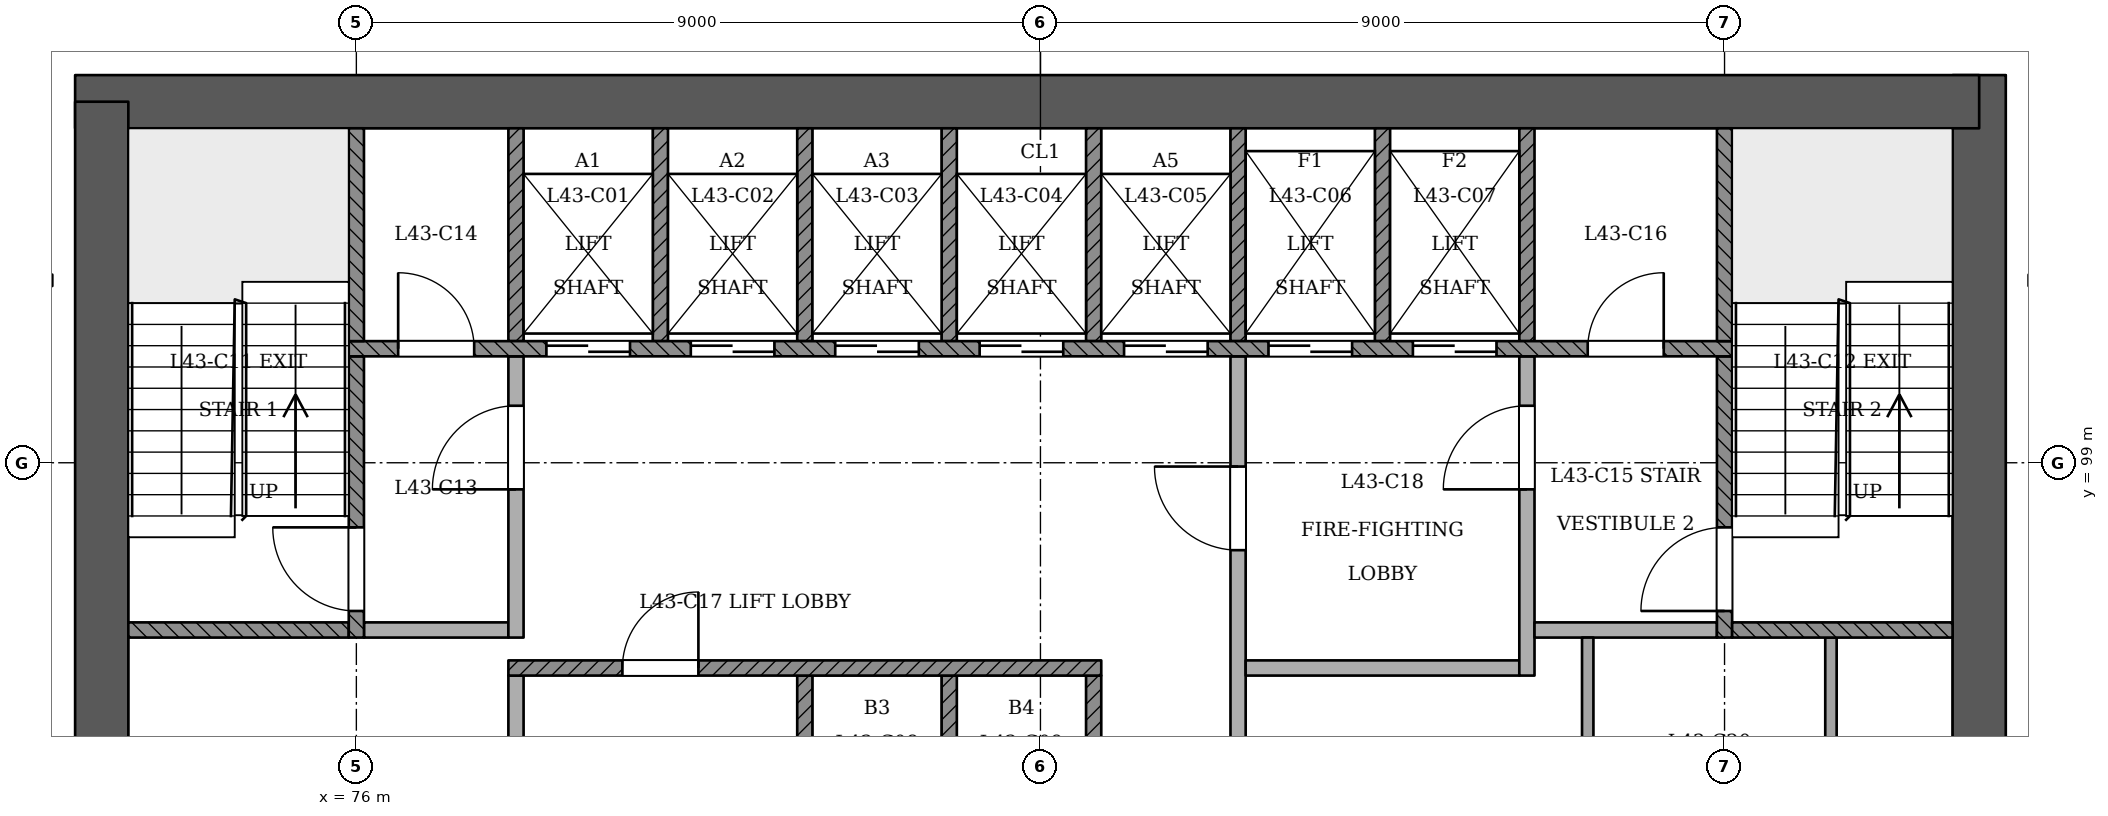
"""IFC4 building model, lengths in metres.
Left out: names, types, materials, properties, quantities, classifications, styles, units other than length and angle.
Written with IfcOpenShell. Run it as: python <this file> out.ifc"""

import sys

from ifc_helpers import new_model, si_unit, direction, frame, frame_2d, origin, place, context, subcontext, project, spatial, rectangle, extrude, element, fill, save


model = new_model("IFC4")
c1 = context("Model", 3, precision=1e-05, world=origin(), true_north=direction((0.0, 1.0)))
c2 = subcontext(c1, "Body", "Model", "MODEL_VIEW")
j1 = project(units=[si_unit("LENGTHUNIT", "METRE"), si_unit("PLANEANGLEUNIT", "RADIAN")], contexts=[c1])
p1 = place(None, origin())
s1 = spatial("IfcSite", under=j1, at=p1, CompositionType="ELEMENT")
p2 = place(p1, origin())
s2 = spatial("IfcBuilding", under=s1, at=p2, CompositionType="ELEMENT")
p3 = place(p2, frame((0.0, 0.0, 167.4)))
s3 = spatial("IfcBuildingStorey", under=s2, at=p3, CompositionType="ELEMENT", Elevation=167.4)
p4 = place(p3, frame((97.35, 93.05, 0.0), z_axis=(0.0, 0.0, 1.0), x_axis=(0.0, 1.0, 0.0)))
e1 = element("IfcWall", 1, at=p4, inside=s3, PredefinedType="SHEAR", context=c2, shape_type="SweptSolid", body=[
    extrude(rectangle(XDim=11.05, YDim=0.7, at=frame_2d((5.525, 0.0))), origin(), (0.0, 0.0, 1.0), 3.6),
])
p5 = place(p3, frame((97.35, 103.75, 0.0), z_axis=(0.0, 0.0, 1.0), x_axis=(-1.0, 0.0, 0.0)))
e2 = element("IfcWall", 2, at=p5, inside=s3, PredefinedType="SHEAR", context=c2, shape_type="SweptSolid", body=[
    extrude(rectangle(XDim=25.05, YDim=0.7, at=frame_2d((12.525, 0.0))), origin(), (0.0, 0.0, 1.0), 3.6),
])
p6 = place(p3, frame((72.65, 103.75, 0.0), z_axis=(0.0, 0.0, 1.0), x_axis=(0.0, -1.0, 0.0)))
e3 = element("IfcWall", 3, at=p6, inside=s3, PredefinedType="SHEAR", context=c2, shape_type="SweptSolid", body=[
    extrude(rectangle(XDim=11.05, YDim=0.7, at=frame_2d((5.525, 0.0))), origin(), (0.0, 0.0, 1.0), 3.6),
])
p7 = place(p3, frame((78.1, 93.4, 0.0), z_axis=(0.0, 0.0, 1.0), x_axis=(0.0, 1.0, 0.0)))
e4 = element("IfcWall", 4, at=p7, inside=s3, PredefinedType="PARTITIONING", context=c2, shape_type="SweptSolid", body=[
    extrude(rectangle(XDim=2.8, YDim=0.2, at=frame_2d((1.4, 0.0))), origin(), (0.0, 0.0, 1.0), 3.15),
])
for number, where, z_axis, x_axis in (
    (5, (81.9, 93.4, 0.0), (0.0, 0.0, 1.0), (0.0, 1.0, 0.0)),
    (6, (83.8, 93.4, 0.0), (0.0, 0.0, 1.0), (0.0, 1.0, 0.0)),
    (7, (85.7, 93.4, 0.0), (0.0, 0.0, 1.0), (0.0, 1.0, 0.0)),
):
    element("IfcWall", number, at=place(p3, frame(where, z_axis=z_axis, x_axis=x_axis)), inside=s3, PredefinedType="SOLIDWALL", context=c2, shape_type="SweptSolid", body=[
        extrude(rectangle(XDim=2.8, YDim=0.2, at=frame_2d((1.4, 0.0))), origin(), (0.0, 0.0, 1.0), 3.15),
    ])
p8 = place(p3, frame((87.6, 93.4, 0.0), z_axis=(0.0, 0.0, 1.0), x_axis=(0.0, 1.0, 0.0)))
e8 = element("IfcWall", 8, at=p8, inside=s3, PredefinedType="PARTITIONING", context=c2, shape_type="SweptSolid", body=[
    extrude(rectangle(XDim=7.0, YDim=0.2, at=frame_2d((3.5, 0.0))), origin(), (0.0, 0.0, 1.0), 3.15),
])
p9 = place(p8, frame((4.45, 0.0, 0.0)))
e9 = element("IfcOpeningElement", 9, at=p9, cuts=e8, PredefinedType="OPENING", context=c2, shape_type="SweptSolid", body=[
    extrude(rectangle(XDim=1.1, YDim=2.1, at=frame_2d((0.55, 1.05))), frame((0.0, 0.11, 0.0), z_axis=(0.0, -1.0, 0.0), x_axis=(1.0, 0.0, 0.0)), (0.0, 0.0, 1.0), 0.221),
])
for number, where, z_axis, x_axis in (
    (10, (92.2, 93.4, 0.0), (0.0, 0.0, 1.0), (0.0, 1.0, 0.0)),
    (11, (95.4, 93.4, 0.0), (0.0, 0.0, 1.0), (0.0, 1.0, 0.0)),
):
    element("IfcWall", number, at=place(p3, frame(where, z_axis=z_axis, x_axis=x_axis)), inside=s3, PredefinedType="PARTITIONING", context=c2, shape_type="SweptSolid", body=[
        extrude(rectangle(XDim=3.3, YDim=0.15, at=frame_2d((1.65, 0.0))), origin(), (0.0, 0.0, 1.0), 3.15),
    ])
p10 = place(p3, frame((78.0, 96.3, 0.0), z_axis=(0.0, 0.0, 1.0), x_axis=(1.0, 0.0, 0.0)))
e12 = element("IfcWall", 12, at=p10, inside=s3, PredefinedType="SOLIDWALL", context=c2, shape_type="SweptSolid", body=[
    extrude(rectangle(XDim=7.8, YDim=0.2, at=frame_2d((3.9, 0.0))), origin(), (0.0, 0.0, 1.0), 3.15),
])
p11 = place(p10, frame((1.5, 0.0, 0.0)))
e13 = element("IfcOpeningElement", 13, at=p11, cuts=e12, PredefinedType="OPENING", context=c2, shape_type="SweptSolid", body=[
    extrude(rectangle(XDim=1.0, YDim=2.1, at=frame_2d((0.5, 1.05))), frame((0.0, 0.11, 0.0), z_axis=(0.0, -1.0, 0.0), x_axis=(1.0, 0.0, 0.0)), (0.0, 0.0, 1.0), 0.221),
])
p12 = place(p3, frame((87.7, 96.3, 0.0), z_axis=(0.0, 0.0, 1.0), x_axis=(1.0, 0.0, 0.0)))
e14 = element("IfcWall", 14, at=p12, inside=s3, PredefinedType="PARTITIONING", context=c2, shape_type="SweptSolid", body=[
    extrude(rectangle(XDim=3.6, YDim=0.2, at=frame_2d((1.8, 0.0))), origin(), (0.0, 0.0, 1.0), 3.15),
])
p13 = place(p3, frame((91.4, 96.2, 0.0), z_axis=(0.0, 0.0, 1.0), x_axis=(0.0, 1.0, 0.0)))
e15 = element("IfcWall", 15, at=p13, inside=s3, PredefinedType="PARTITIONING", context=c2, shape_type="SweptSolid", body=[
    extrude(rectangle(XDim=4.2, YDim=0.2, at=frame_2d((2.1, 0.0))), origin(), (0.0, 0.0, 1.0), 3.15),
])
p14 = place(p13, frame((2.45, 0.0, 0.0)))
e16 = element("IfcOpeningElement", 16, at=p14, cuts=e15, PredefinedType="OPENING", context=c2, shape_type="SweptSolid", body=[
    extrude(rectangle(XDim=1.1, YDim=2.1, at=frame_2d((0.55, 1.05))), frame((0.0, 0.11, 0.0), z_axis=(0.0, -1.0, 0.0), x_axis=(1.0, 0.0, 0.0)), (0.0, 0.0, 1.0), 0.221),
])
p15 = place(p3, frame((73.0, 96.8, 0.0), z_axis=(0.0, 0.0, 1.0), x_axis=(1.0, 0.0, 0.0)))
e17 = element("IfcWall", 17, at=p15, inside=s3, PredefinedType="SOLIDWALL", context=c2, shape_type="SweptSolid", body=[
    extrude(rectangle(XDim=2.9, YDim=0.2, at=frame_2d((1.45, 0.0))), origin(), (0.0, 0.0, 1.0), 3.15),
])
p16 = place(p3, frame((76.0, 96.7, 0.0), z_axis=(0.0, 0.0, 1.0), x_axis=(0.0, 1.0, 0.0)))
e18 = element("IfcWall", 18, at=p16, inside=s3, PredefinedType="SOLIDWALL", context=c2, shape_type="SweptSolid", body=[
    extrude(rectangle(XDim=3.7, YDim=0.2, at=frame_2d((1.85, 0.0))), origin(), (0.0, 0.0, 1.0), 3.15),
])
p17 = place(p16, frame((0.35, 0.0, 0.0)))
e19 = element("IfcOpeningElement", 19, at=p17, cuts=e18, PredefinedType="OPENING", context=c2, shape_type="SweptSolid", body=[
    extrude(rectangle(XDim=1.1, YDim=2.1, at=frame_2d((0.55, 1.05))), frame((0.0, 0.11, 0.0), z_axis=(0.0, -1.0, 0.0), x_axis=(1.0, 0.0, 0.0)), (0.0, 0.0, 1.0), 0.221),
])
p18 = place(p3, frame((76.1, 96.8, 0.0), z_axis=(0.0, 0.0, 1.0), x_axis=(1.0, 0.0, 0.0)))
e20 = element("IfcWall", 20, at=p18, inside=s3, PredefinedType="PARTITIONING", context=c2, shape_type="SweptSolid", body=[
    extrude(rectangle(XDim=1.9, YDim=0.2, at=frame_2d((0.95, 0.0))), origin(), (0.0, 0.0, 1.0), 3.15),
])
p19 = place(p3, frame((78.1, 96.7, 0.0), z_axis=(0.0, 0.0, 1.0), x_axis=(0.0, 1.0, 0.0)))
e21 = element("IfcWall", 21, at=p19, inside=s3, PredefinedType="PARTITIONING", context=c2, shape_type="SweptSolid", body=[
    extrude(rectangle(XDim=3.7, YDim=0.2, at=frame_2d((1.85, 0.0))), origin(), (0.0, 0.0, 1.0), 3.15),
])
p20 = place(p19, frame((1.95, 0.0, 0.0)))
e22 = element("IfcOpeningElement", 22, at=p20, cuts=e21, PredefinedType="OPENING", context=c2, shape_type="SweptSolid", body=[
    extrude(rectangle(XDim=1.1, YDim=2.1, at=frame_2d((0.55, 1.05))), frame((0.0, 0.11, 0.0), z_axis=(0.0, -1.0, 0.0), x_axis=(1.0, 0.0, 0.0)), (0.0, 0.0, 1.0), 0.221),
])
p21 = place(p3, frame((91.5, 96.8, 0.0), z_axis=(0.0, 0.0, 1.0), x_axis=(1.0, 0.0, 0.0)))
e23 = element("IfcWall", 23, at=p21, inside=s3, PredefinedType="PARTITIONING", context=c2, shape_type="SweptSolid", body=[
    extrude(rectangle(XDim=2.4, YDim=0.2, at=frame_2d((1.2, 0.0))), origin(), (0.0, 0.0, 1.0), 3.15),
])
p22 = place(p3, frame((94.0, 96.7, 0.0), z_axis=(0.0, 0.0, 1.0), x_axis=(0.0, 1.0, 0.0)))
e24 = element("IfcWall", 24, at=p22, inside=s3, PredefinedType="SOLIDWALL", context=c2, shape_type="SweptSolid", body=[
    extrude(rectangle(XDim=3.7, YDim=0.2, at=frame_2d((1.85, 0.0))), origin(), (0.0, 0.0, 1.0), 3.15),
])
p23 = place(p22, frame((0.35, 0.0, 0.0)))
e25 = element("IfcOpeningElement", 25, at=p23, cuts=e24, PredefinedType="OPENING", context=c2, shape_type="SweptSolid", body=[
    extrude(rectangle(XDim=1.1, YDim=2.1, at=frame_2d((0.55, 1.05))), frame((0.0, 0.11, 0.0), z_axis=(0.0, -1.0, 0.0), x_axis=(1.0, 0.0, 0.0)), (0.0, 0.0, 1.0), 0.221),
])
p24 = place(p3, frame((94.1, 96.8, 0.0), z_axis=(0.0, 0.0, 1.0), x_axis=(1.0, 0.0, 0.0)))
e26 = element("IfcWall", 26, at=p24, inside=s3, PredefinedType="SOLIDWALL", context=c2, shape_type="SweptSolid", body=[
    extrude(rectangle(XDim=2.9, YDim=0.2, at=frame_2d((1.45, 0.0))), origin(), (0.0, 0.0, 1.0), 3.15),
])
p25 = place(p3, frame((75.9, 100.5, 0.0), z_axis=(0.0, 0.0, 1.0), x_axis=(1.0, 0.0, 0.0)))
e27 = element("IfcWall", 27, at=p25, inside=s3, PredefinedType="SOLIDWALL", context=c2, shape_type="SweptSolid", body=[
    extrude(rectangle(XDim=18.2, YDim=0.2, at=frame_2d((9.1, 0.0))), origin(), (0.0, 0.0, 1.0), 3.15),
])
p26 = place(p25, frame((2.6, 0.0, 0.0)))
e28 = element("IfcOpeningElement", 28, at=p26, cuts=e27, PredefinedType="OPENING", context=c2, shape_type="SweptSolid", body=[
    extrude(rectangle(XDim=1.1, YDim=2.1, at=frame_2d((0.55, 1.05))), frame((0.0, 0.11, 0.0), z_axis=(0.0, -1.0, 0.0), x_axis=(1.0, 0.0, 0.0)), (0.0, 0.0, 1.0), 0.221),
])
p27 = place(p25, frame((4.5, 0.0, 0.0)))
e29 = element("IfcOpeningElement", 29, at=p27, cuts=e27, PredefinedType="OPENING", context=c2, shape_type="SweptSolid", body=[
    extrude(rectangle(XDim=1.1, YDim=2.1, at=frame_2d((0.55, 1.05))), frame((0.0, 0.11, 0.0), z_axis=(0.0, -1.0, 0.0), x_axis=(1.0, 0.0, 0.0)), (0.0, 0.0, 1.0), 0.221),
])
p28 = place(p25, frame((6.4, 0.0, 0.0)))
e30 = element("IfcOpeningElement", 30, at=p28, cuts=e27, PredefinedType="OPENING", context=c2, shape_type="SweptSolid", body=[
    extrude(rectangle(XDim=1.1, YDim=2.1, at=frame_2d((0.55, 1.05))), frame((0.0, 0.11, 0.0), z_axis=(0.0, -1.0, 0.0), x_axis=(1.0, 0.0, 0.0)), (0.0, 0.0, 1.0), 0.221),
])
p29 = place(p25, frame((8.3, 0.0, 0.0)))
e31 = element("IfcOpeningElement", 31, at=p29, cuts=e27, PredefinedType="OPENING", context=c2, shape_type="SweptSolid", body=[
    extrude(rectangle(XDim=1.1, YDim=2.1, at=frame_2d((0.55, 1.05))), frame((0.0, 0.11, 0.0), z_axis=(0.0, -1.0, 0.0), x_axis=(1.0, 0.0, 0.0)), (0.0, 0.0, 1.0), 0.221),
])
p30 = place(p25, frame((10.2, 0.0, 0.0)))
e32 = element("IfcOpeningElement", 32, at=p30, cuts=e27, PredefinedType="OPENING", context=c2, shape_type="SweptSolid", body=[
    extrude(rectangle(XDim=1.1, YDim=2.1, at=frame_2d((0.55, 1.05))), frame((0.0, 0.11, 0.0), z_axis=(0.0, -1.0, 0.0), x_axis=(1.0, 0.0, 0.0)), (0.0, 0.0, 1.0), 0.221),
])
p31 = place(p25, frame((12.1, 0.0, 0.0)))
e33 = element("IfcOpeningElement", 33, at=p31, cuts=e27, PredefinedType="OPENING", context=c2, shape_type="SweptSolid", body=[
    extrude(rectangle(XDim=1.1, YDim=2.1, at=frame_2d((0.55, 1.05))), frame((0.0, 0.11, 0.0), z_axis=(0.0, -1.0, 0.0), x_axis=(1.0, 0.0, 0.0)), (0.0, 0.0, 1.0), 0.221),
])
p32 = place(p25, frame((14.0, 0.0, 0.0)))
e34 = element("IfcOpeningElement", 34, at=p32, cuts=e27, PredefinedType="OPENING", context=c2, shape_type="SweptSolid", body=[
    extrude(rectangle(XDim=1.1, YDim=2.1, at=frame_2d((0.55, 1.05))), frame((0.0, 0.11, 0.0), z_axis=(0.0, -1.0, 0.0), x_axis=(1.0, 0.0, 0.0)), (0.0, 0.0, 1.0), 0.221),
])
p33 = place(p25, frame((0.65, 0.0, 0.0)))
e35 = element("IfcOpeningElement", 35, at=p33, cuts=e27, PredefinedType="OPENING", context=c2, shape_type="SweptSolid", body=[
    extrude(rectangle(XDim=1.0, YDim=2.1, at=frame_2d((0.5, 1.05))), frame((0.0, 0.11, 0.0), z_axis=(0.0, -1.0, 0.0), x_axis=(1.0, 0.0, 0.0)), (0.0, 0.0, 1.0), 0.221),
])
p34 = place(p25, frame((16.3, 0.0, 0.0)))
e36 = element("IfcOpeningElement", 36, at=p34, cuts=e27, PredefinedType="OPENING", context=c2, shape_type="SweptSolid", body=[
    extrude(rectangle(XDim=1.0, YDim=2.1, at=frame_2d((0.5, 1.05))), frame((0.0, 0.11, 0.0), z_axis=(0.0, -1.0, 0.0), x_axis=(1.0, 0.0, 0.0)), (0.0, 0.0, 1.0), 0.221),
])
for number, where, z_axis, x_axis in (
    (37, (76.0, 100.6, 0.0), (0.0, 0.0, 1.0), (0.0, 1.0, 0.0)),
    (38, (78.1, 100.6, 0.0), (0.0, 0.0, 1.0), (0.0, 1.0, 0.0)),
    (39, (80.0, 100.6, 0.0), (0.0, 0.0, 1.0), (0.0, 1.0, 0.0)),
    (40, (81.9, 100.6, 0.0), (0.0, 0.0, 1.0), (0.0, 1.0, 0.0)),
    (41, (83.8, 100.6, 0.0), (0.0, 0.0, 1.0), (0.0, 1.0, 0.0)),
    (42, (85.7, 100.6, 0.0), (0.0, 0.0, 1.0), (0.0, 1.0, 0.0)),
    (43, (87.6, 100.6, 0.0), (0.0, 0.0, 1.0), (0.0, 1.0, 0.0)),
    (44, (89.5, 100.6, 0.0), (0.0, 0.0, 1.0), (0.0, 1.0, 0.0)),
    (45, (91.4, 100.6, 0.0), (0.0, 0.0, 1.0), (0.0, 1.0, 0.0)),
    (46, (94.0, 100.6, 0.0), (0.0, 0.0, 1.0), (0.0, 1.0, 0.0)),
):
    element("IfcWall", number, at=place(p3, frame(where, z_axis=z_axis, x_axis=x_axis)), inside=s3, PredefinedType="SOLIDWALL", context=c2, shape_type="SweptSolid", body=[
        extrude(rectangle(XDim=2.8, YDim=0.2, at=frame_2d((1.4, 0.0))), origin(), (0.0, 0.0, 1.0), 3.15),
    ])
p35 = place(p26, origin())
e47 = element("IfcDoor", 47, at=p35, inside=s3, OperationType="SLIDING_TO_RIGHT", PredefinedType="NOTDEFINED", context=c2, shape_type="SweptSolid", body=[
    extrude(rectangle(XDim=1.1, YDim=2.1, at=frame_2d((0.55, 1.05))), frame((0.0, 0.025, 0.0), z_axis=(0.0, -1.0, 0.0), x_axis=(1.0, 0.0, 0.0)), (0.0, 0.0, 1.0), 0.05),
])
fill(e28, e47)
p36 = place(p27, origin())
e48 = element("IfcDoor", 48, at=p36, inside=s3, OperationType="SLIDING_TO_LEFT", PredefinedType="NOTDEFINED", context=c2, shape_type="SweptSolid", body=[
    extrude(rectangle(XDim=1.1, YDim=2.1, at=frame_2d((0.55, 1.05))), frame((0.0, 0.025, 0.0), z_axis=(0.0, -1.0, 0.0), x_axis=(1.0, 0.0, 0.0)), (0.0, 0.0, 1.0), 0.05),
])
fill(e29, e48)
p37 = place(p28, origin())
e49 = element("IfcDoor", 49, at=p37, inside=s3, OperationType="SLIDING_TO_RIGHT", PredefinedType="NOTDEFINED", context=c2, shape_type="SweptSolid", body=[
    extrude(rectangle(XDim=1.1, YDim=2.1, at=frame_2d((0.55, 1.05))), frame((0.0, 0.025, 0.0), z_axis=(0.0, -1.0, 0.0), x_axis=(1.0, 0.0, 0.0)), (0.0, 0.0, 1.0), 0.05),
])
fill(e30, e49)
p38 = place(p29, origin())
e50 = element("IfcDoor", 50, at=p38, inside=s3, OperationType="SLIDING_TO_LEFT", PredefinedType="NOTDEFINED", context=c2, shape_type="SweptSolid", body=[
    extrude(rectangle(XDim=1.1, YDim=2.1, at=frame_2d((0.55, 1.05))), frame((0.0, 0.025, 0.0), z_axis=(0.0, -1.0, 0.0), x_axis=(1.0, 0.0, 0.0)), (0.0, 0.0, 1.0), 0.05),
])
fill(e31, e50)
p39 = place(p30, origin())
e51 = element("IfcDoor", 51, at=p39, inside=s3, OperationType="SLIDING_TO_RIGHT", PredefinedType="NOTDEFINED", context=c2, shape_type="SweptSolid", body=[
    extrude(rectangle(XDim=1.1, YDim=2.1, at=frame_2d((0.55, 1.05))), frame((0.0, 0.025, 0.0), z_axis=(0.0, -1.0, 0.0), x_axis=(1.0, 0.0, 0.0)), (0.0, 0.0, 1.0), 0.05),
])
fill(e32, e51)
p40 = place(p31, origin())
e52 = element("IfcDoor", 52, at=p40, inside=s3, OperationType="SLIDING_TO_RIGHT", PredefinedType="NOTDEFINED", context=c2, shape_type="SweptSolid", body=[
    extrude(rectangle(XDim=1.1, YDim=2.1, at=frame_2d((0.55, 1.05))), frame((0.0, 0.025, 0.0), z_axis=(0.0, -1.0, 0.0), x_axis=(1.0, 0.0, 0.0)), (0.0, 0.0, 1.0), 0.05),
])
fill(e33, e52)
p41 = place(p32, origin())
e53 = element("IfcDoor", 53, at=p41, inside=s3, OperationType="SLIDING_TO_LEFT", PredefinedType="NOTDEFINED", context=c2, shape_type="SweptSolid", body=[
    extrude(rectangle(XDim=1.1, YDim=2.1, at=frame_2d((0.55, 1.05))), frame((0.0, 0.025, 0.0), z_axis=(0.0, -1.0, 0.0), x_axis=(1.0, 0.0, 0.0)), (0.0, 0.0, 1.0), 0.05),
])
fill(e34, e53)
p42 = place(p17, origin())
e54 = element("IfcDoor", 54, at=p42, inside=s3, OperationType="SINGLE_SWING_RIGHT", PredefinedType="NOTDEFINED", context=c2, shape_type="SweptSolid", body=[
    extrude(rectangle(XDim=1.1, YDim=2.1, at=frame_2d((0.55, 1.05))), frame((0.0, 0.025, 0.0), z_axis=(0.0, -1.0, 0.0), x_axis=(1.0, 0.0, 0.0)), (0.0, 0.0, 1.0), 0.05),
])
fill(e19, e54)
p43 = place(p23, origin())
e55 = element("IfcDoor", 55, at=p43, inside=s3, OperationType="SINGLE_SWING_LEFT", PredefinedType="NOTDEFINED", context=c2, shape_type="SweptSolid", body=[
    extrude(rectangle(XDim=1.1, YDim=2.1, at=frame_2d((0.55, 1.05))), frame((0.0, 0.025, 0.0), z_axis=(0.0, -1.0, 0.0), x_axis=(1.0, 0.0, 0.0)), (0.0, 0.0, 1.0), 0.05),
])
fill(e25, e55)
p44 = place(p20, origin())
e56 = element("IfcDoor", 56, at=p44, inside=s3, OperationType="SINGLE_SWING_LEFT", PredefinedType="NOTDEFINED", context=c2, shape_type="SweptSolid", body=[
    extrude(rectangle(XDim=1.1, YDim=2.1, at=frame_2d((0.55, 1.05))), frame((0.0, 0.025, 0.0), z_axis=(0.0, -1.0, 0.0), x_axis=(1.0, 0.0, 0.0)), (0.0, 0.0, 1.0), 0.05),
])
fill(e22, e56)
p45 = place(p9, origin())
e57 = element("IfcDoor", 57, at=p45, inside=s3, OperationType="SINGLE_SWING_RIGHT", PredefinedType="NOTDEFINED", context=c2, shape_type="SweptSolid", body=[
    extrude(rectangle(XDim=1.1, YDim=2.1, at=frame_2d((0.55, 1.05))), frame((0.0, 0.025, 0.0), z_axis=(0.0, -1.0, 0.0), x_axis=(1.0, 0.0, 0.0)), (0.0, 0.0, 1.0), 0.05),
])
fill(e9, e57)
p46 = place(p14, origin())
e58 = element("IfcDoor", 58, at=p46, inside=s3, OperationType="SINGLE_SWING_LEFT", PredefinedType="NOTDEFINED", context=c2, shape_type="SweptSolid", body=[
    extrude(rectangle(XDim=1.1, YDim=2.1, at=frame_2d((0.55, 1.05))), frame((0.0, 0.025, 0.0), z_axis=(0.0, -1.0, 0.0), x_axis=(1.0, 0.0, 0.0)), (0.0, 0.0, 1.0), 0.05),
])
fill(e16, e58)
p47 = place(p33, origin())
e59 = element("IfcDoor", 59, at=p47, inside=s3, OperationType="SINGLE_SWING_LEFT", PredefinedType="NOTDEFINED", context=c2, shape_type="SweptSolid", body=[
    extrude(rectangle(XDim=1.0, YDim=2.1, at=frame_2d((0.5, 1.05))), frame((0.0, 0.025, 0.0), z_axis=(0.0, -1.0, 0.0), x_axis=(1.0, 0.0, 0.0)), (0.0, 0.0, 1.0), 0.05),
])
fill(e35, e59)
p48 = place(p34, origin())
e60 = element("IfcDoor", 60, at=p48, inside=s3, OperationType="SINGLE_SWING_RIGHT", PredefinedType="NOTDEFINED", context=c2, shape_type="SweptSolid", body=[
    extrude(rectangle(XDim=1.0, YDim=2.1, at=frame_2d((0.5, 1.05))), frame((0.0, 0.025, 0.0), z_axis=(0.0, -1.0, 0.0), x_axis=(1.0, 0.0, 0.0)), (0.0, 0.0, 1.0), 0.05),
])
fill(e36, e60)
p49 = place(p11, origin())
e61 = element("IfcDoor", 61, at=p49, inside=s3, OperationType="SINGLE_SWING_RIGHT", PredefinedType="NOTDEFINED", context=c2, shape_type="SweptSolid", body=[
    extrude(rectangle(XDim=1.0, YDim=2.1, at=frame_2d((0.5, 1.05))), frame((0.0, 0.025, 0.0), z_axis=(0.0, -1.0, 0.0), x_axis=(1.0, 0.0, 0.0)), (0.0, 0.0, 1.0), 0.05),
])
fill(e13, e61)
save(model, sys.argv[1])
